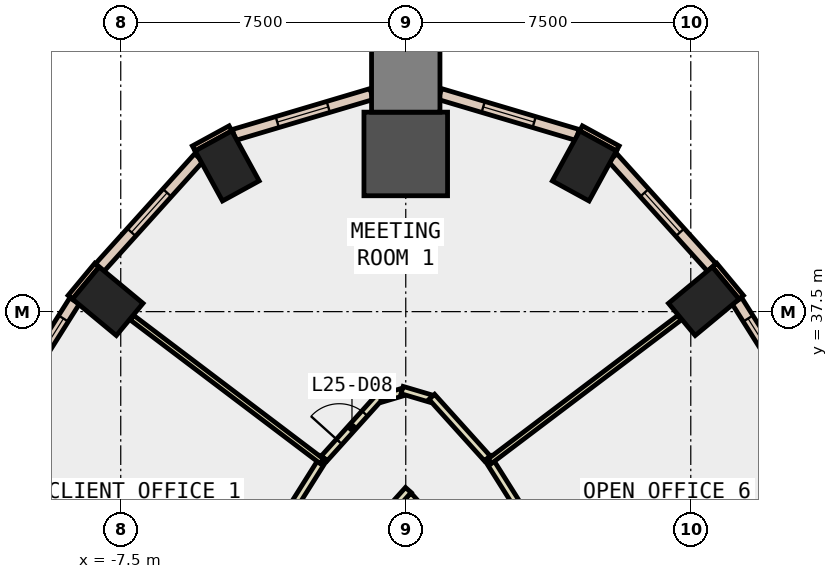
"""IFC4 building model, lengths in metres.
Left out: names, types, materials, properties, quantities, classifications, styles, units other than length and angle.
Written with IfcOpenShell. Run it as: python <this file> out.ifc"""

import sys

from ifc_helpers import new_model, si_unit, direction, frame, frame_2d, origin, origin_2d, place, context, subcontext, project, spatial, rectangle, extrude, element, fill, save


model = new_model("IFC4")
c1 = context("Model", 3, precision=1e-05, world=origin(), true_north=direction((0.0, 1.0)))
c2 = subcontext(c1, "Body", "Model", "MODEL_VIEW")
j1 = project(units=[si_unit("LENGTHUNIT", "METRE"), si_unit("PLANEANGLEUNIT", "RADIAN")], contexts=[c1])
p1 = place(None, origin())
s1 = spatial("IfcSite", under=j1, at=p1, CompositionType="ELEMENT")
p2 = place(p1, origin())
s2 = spatial("IfcBuilding", under=s1, at=p2, CompositionType="ELEMENT")
p3 = place(p2, frame((0.0, 0.0, 116.0)))
s3 = spatial("IfcBuildingStorey", under=s2, at=p3, CompositionType="ELEMENT", Elevation=116.0)
for number, where, z_axis, x_axis in (
    (1, (7.842, 37.774, -0.4), (0.0, 0.0, 1.0), (-0.638, 0.77, 0.0)),
    (2, (4.7, 41.334, -0.4), (0.0, 0.0, 1.0), (-0.877, 0.48, 0.0)),
):
    element("IfcColumn", number, at=place(p3, frame(where, z_axis=z_axis, x_axis=x_axis)), inside=s3, PredefinedType="COLUMN", context=c2, shape_type="SweptSolid", body=[
        extrude(rectangle(XDim=1.1, YDim=1.5, at=origin_2d()), origin(), (0.0, 0.0, 1.0), 4.2),
    ])
p4 = place(p3, frame((0.0, 41.649, -0.4), z_axis=(0.0, 0.0, 1.0), x_axis=(0.0, 1.0, 0.0)))
e3 = element("IfcColumn", 3, at=p4, inside=s3, PredefinedType="COLUMN", context=c2, shape_type="SweptSolid", body=[
    extrude(rectangle(XDim=2.2, YDim=2.2, at=origin_2d()), origin(), (0.0, 0.0, 1.0), 4.2),
])
for number, where, z_axis, x_axis in (
    (4, (-4.7, 41.334, -0.4), (0.0, 0.0, 1.0), (0.877, 0.48, 0.0)),
    (5, (-7.842, 37.774, -0.4), (0.0, 0.0, 1.0), (0.638, 0.77, 0.0)),
):
    element("IfcColumn", number, at=place(p3, frame(where, z_axis=z_axis, x_axis=x_axis)), inside=s3, PredefinedType="COLUMN", context=c2, shape_type="SweptSolid", body=[
        extrude(rectangle(XDim=1.1, YDim=1.5, at=origin_2d()), origin(), (0.0, 0.0, 1.0), 4.2),
    ])
p5 = place(p3, frame((0.0, 43.649, -0.4), z_axis=(0.0, 0.0, 1.0), x_axis=(0.0, 1.0, 0.0)))
e6 = element("IfcColumn", 6, at=p5, inside=s3, PredefinedType="COLUMN", context=c2, shape_type="SweptSolid", body=[
    extrude(rectangle(XDim=1.8, YDim=1.8, at=origin_2d()), origin(), (0.0, 0.0, 1.0), 4.2),
])
for number, where, z_axis, x_axis in (
    (7, (5.579, 41.794, 0.0), (0.0, 0.0, 1.0), (-0.877, 0.48, 0.0)),
    (8, (-4.613, 42.322, 0.0), (0.0, 0.0, 1.0), (-0.877, -0.48, 0.0)),
):
    element("IfcWall", number, at=place(p3, frame(where, z_axis=z_axis, x_axis=x_axis)), inside=s3, PredefinedType="STANDARD", context=c2, shape_type="SweptSolid", body=[
        extrude(rectangle(XDim=1.101, YDim=0.15, at=frame_2d((0.551, 0.0))), origin(), (0.0, 0.0, 1.0), 3.8),
    ])
for number, where, z_axis, x_axis in (
    (9, (8.828, 37.878, 0.0), (0.0, 0.0, 1.0), (-0.638, 0.77, 0.0)),
    (10, (-8.126, 38.724, 0.0), (0.0, 0.0, 1.0), (-0.638, -0.77, 0.0)),
):
    element("IfcWall", number, at=place(p3, frame(where, z_axis=z_axis, x_axis=x_axis)), inside=s3, PredefinedType="STANDARD", context=c2, shape_type="SweptSolid", body=[
        extrude(rectangle(XDim=1.099, YDim=0.15, at=frame_2d((0.55, 0.0))), origin(), (0.0, 0.0, 1.0), 3.8),
    ])
p6 = place(p3, frame((12.018, 32.535, 0.0), z_axis=(0.0, 0.0, 1.0), x_axis=(-0.532699467907, 0.846304482377, 0.0)))
e11 = element("IfcWall", 11, at=p6, inside=s3, PredefinedType="STANDARD", context=c2, shape_type="SweptSolid", body=[
    extrude(rectangle(XDim=6.202, YDim=0.3, at=frame_2d((3.101, 0.0))), origin(), (0.0, 0.0, 1.0), 3.8),
])
p7 = place(p6, frame((0.551, 0.0, 0.9)))
e12 = element("IfcOpeningElement", 12, at=p7, cuts=e11, PredefinedType="OPENING", context=c2, shape_type="SweptSolid", body=[
    extrude(rectangle(XDim=2.0, YDim=2.6, at=frame_2d((1.0, 1.3))), frame((0.0, 0.16, 0.0), z_axis=(0.0, -1.0, 0.0), x_axis=(1.0, 0.0, 0.0)), (0.0, 0.0, 1.0), 0.32),
])
p8 = place(p6, frame((3.652, 0.0, 0.9)))
e13 = element("IfcOpeningElement", 13, at=p8, cuts=e11, PredefinedType="OPENING", context=c2, shape_type="SweptSolid", body=[
    extrude(rectangle(XDim=2.0, YDim=2.6, at=frame_2d((1.0, 1.3))), frame((0.0, 0.16, 0.0), z_axis=(0.0, -1.0, 0.0), x_axis=(1.0, 0.0, 0.0)), (0.0, 0.0, 1.0), 0.32),
])
p9 = place(p3, frame((8.052, 38.661, 0.0), z_axis=(0.0, 0.0, 1.0), x_axis=(-0.66966434159, 0.742663900834, 0.0)))
e14 = element("IfcWall", 14, at=p9, inside=s3, PredefinedType="STANDARD", context=c2, shape_type="SweptSolid", body=[
    extrude(rectangle(XDim=3.893, YDim=0.3, at=frame_2d((1.946, 0.0))), origin(), (0.0, 0.0, 1.0), 3.8),
])
p10 = place(p9, frame((1.246, 0.0, 0.9)))
e15 = element("IfcOpeningElement", 15, at=p10, cuts=e14, PredefinedType="OPENING", context=c2, shape_type="SweptSolid", body=[
    extrude(rectangle(XDim=1.4, YDim=2.6, at=frame_2d((0.7, 1.3))), frame((0.0, 0.16, 0.0), z_axis=(0.0, -1.0, 0.0), x_axis=(1.0, 0.0, 0.0)), (0.0, 0.0, 1.0), 0.32),
])
p11 = place(p3, frame((4.52, 42.149, 0.0), z_axis=(0.0, 0.0, 1.0), x_axis=(-0.958563070772, 0.284880394819, 0.0)))
e16 = element("IfcWall", 16, at=p11, inside=s3, PredefinedType="STANDARD", context=c2, shape_type="SweptSolid", body=[
    extrude(rectangle(XDim=3.778, YDim=0.3, at=frame_2d((1.889, 0.0))), origin(), (0.0, 0.0, 1.0), 3.8),
])
p12 = place(p11, frame((1.189, 0.0, 0.9)))
e17 = element("IfcOpeningElement", 17, at=p12, cuts=e16, PredefinedType="OPENING", context=c2, shape_type="SweptSolid", body=[
    extrude(rectangle(XDim=1.4, YDim=2.6, at=frame_2d((0.7, 1.3))), frame((0.0, 0.16, 0.0), z_axis=(0.0, -1.0, 0.0), x_axis=(1.0, 0.0, 0.0)), (0.0, 0.0, 1.0), 0.32),
])
p13 = place(p3, frame((-0.899, 43.225, 0.0), z_axis=(0.0, 0.0, 1.0), x_axis=(-0.958563070772, -0.284880394819, 0.0)))
e18 = element("IfcWall", 18, at=p13, inside=s3, PredefinedType="STANDARD", context=c2, shape_type="SweptSolid", body=[
    extrude(rectangle(XDim=3.778, YDim=0.3, at=frame_2d((1.889, 0.0))), origin(), (0.0, 0.0, 1.0), 3.8),
])
p14 = place(p13, frame((1.189, 0.0, 0.9)))
e19 = element("IfcOpeningElement", 19, at=p14, cuts=e18, PredefinedType="OPENING", context=c2, shape_type="SweptSolid", body=[
    extrude(rectangle(XDim=1.4, YDim=2.6, at=frame_2d((0.7, 1.3))), frame((0.0, 0.16, 0.0), z_axis=(0.0, -1.0, 0.0), x_axis=(1.0, 0.0, 0.0)), (0.0, 0.0, 1.0), 0.32),
])
p15 = place(p3, frame((-5.445, 41.552, 0.0), z_axis=(0.0, 0.0, 1.0), x_axis=(-0.66966434159, -0.742663900834, 0.0)))
e20 = element("IfcWall", 20, at=p15, inside=s3, PredefinedType="STANDARD", context=c2, shape_type="SweptSolid", body=[
    extrude(rectangle(XDim=3.893, YDim=0.3, at=frame_2d((1.946, 0.0))), origin(), (0.0, 0.0, 1.0), 3.8),
])
p16 = place(p15, frame((1.246, 0.0, 0.9)))
e21 = element("IfcOpeningElement", 21, at=p16, cuts=e20, PredefinedType="OPENING", context=c2, shape_type="SweptSolid", body=[
    extrude(rectangle(XDim=1.4, YDim=2.6, at=frame_2d((0.7, 1.3))), frame((0.0, 0.16, 0.0), z_axis=(0.0, -1.0, 0.0), x_axis=(1.0, 0.0, 0.0)), (0.0, 0.0, 1.0), 0.32),
])
p17 = place(p3, frame((-8.714, 37.784, 0.0), z_axis=(0.0, 0.0, 1.0), x_axis=(-0.532699467907, -0.846304482377, 0.0)))
e22 = element("IfcWall", 22, at=p17, inside=s3, PredefinedType="STANDARD", context=c2, shape_type="SweptSolid", body=[
    extrude(rectangle(XDim=6.202, YDim=0.3, at=frame_2d((3.101, 0.0))), origin(), (0.0, 0.0, 1.0), 3.8),
])
p18 = place(p17, frame((0.551, 0.0, 0.9)))
e23 = element("IfcOpeningElement", 23, at=p18, cuts=e22, PredefinedType="OPENING", context=c2, shape_type="SweptSolid", body=[
    extrude(rectangle(XDim=2.0, YDim=2.6, at=frame_2d((1.0, 1.3))), frame((0.0, 0.16, 0.0), z_axis=(0.0, -1.0, 0.0), x_axis=(1.0, 0.0, 0.0)), (0.0, 0.0, 1.0), 0.32),
])
p19 = place(p17, frame((3.652, 0.0, 0.9)))
e24 = element("IfcOpeningElement", 24, at=p19, cuts=e22, PredefinedType="OPENING", context=c2, shape_type="SweptSolid", body=[
    extrude(rectangle(XDim=2.0, YDim=2.6, at=frame_2d((1.0, 1.3))), frame((0.0, 0.16, 0.0), z_axis=(0.0, -1.0, 0.0), x_axis=(1.0, 0.0, 0.0)), (0.0, 0.0, 1.0), 0.32),
])
p20 = place(p3, frame((0.384, 32.306, 0.0), z_axis=(0.0, 0.0, 1.0), x_axis=(-0.669306261406, 0.742986627365, 0.0)))
e25 = element("IfcWall", 25, at=p20, inside=s3, PredefinedType="PARTITIONING", context=c2, shape_type="SweptSolid", body=[
    extrude(rectangle(XDim=0.474, YDim=0.2, at=frame_2d((0.237, 0.0))), origin(), (0.0, 0.0, 1.0), 3.8),
])
p21 = place(p3, frame((0.067, 32.807, 0.0), z_axis=(0.0, 0.0, 1.0), x_axis=(-0.66900475403, -0.74325812413, 0.0)))
e26 = element("IfcWall", 26, at=p21, inside=s3, PredefinedType="PARTITIONING", context=c2, shape_type="SweptSolid", body=[
    extrude(rectangle(XDim=0.674, YDim=0.2, at=frame_2d((0.337, 0.0))), origin(), (0.0, 0.0, 1.0), 3.8),
])
p22 = place(p3, frame((2.159, 33.649, 0.0), z_axis=(0.0, 0.0, 1.0), x_axis=(0.532784927572, -0.846250684462, 0.0)))
e27 = element("IfcWall", 27, at=p22, inside=s3, PredefinedType="PARTITIONING", context=c2, shape_type="SweptSolid", body=[
    extrude(rectangle(XDim=6.626, YDim=0.2, at=frame_2d((3.313, 0.0))), origin(), (0.0, 0.0, 1.0), 3.8),
])
p23 = place(p22, frame((2.888, 0.0, 0.0)))
e28 = element("IfcOpeningElement", 28, at=p23, cuts=e27, PredefinedType="OPENING", context=c2, shape_type="SweptSolid", body=[
    extrude(rectangle(XDim=1.0, YDim=2.1, at=frame_2d((0.5, 1.05))), frame((0.0, 0.11, 0.0), z_axis=(0.0, -1.0, 0.0), x_axis=(1.0, 0.0, 0.0)), (0.0, 0.0, 1.0), 0.22),
])
p24 = place(p3, frame((-2.145, 33.639, 0.0), z_axis=(0.0, 0.0, 1.0), x_axis=(0.66965737341, 0.742670184023, 0.0)))
e29 = element("IfcWall", 29, at=p24, inside=s3, PredefinedType="PARTITIONING", context=c2, shape_type="SweptSolid", body=[
    extrude(rectangle(XDim=2.18, YDim=0.2, at=frame_2d((1.09, 0.0))), origin(), (0.0, 0.0, 1.0), 3.8),
])
p25 = place(p24, frame((0.59, 0.0, 0.0)))
e30 = element("IfcOpeningElement", 30, at=p25, cuts=e29, PredefinedType="OPENING", context=c2, shape_type="SweptSolid", body=[
    extrude(rectangle(XDim=1.0, YDim=2.1, at=frame_2d((0.5, 1.05))), frame((0.0, 0.11, 0.0), z_axis=(0.0, -1.0, 0.0), x_axis=(1.0, 0.0, 0.0)), (0.0, 0.0, 1.0), 0.22),
])
p26 = place(p3, frame((-0.656, 35.213, 0.0), z_axis=(0.0, 0.0, 1.0), x_axis=(0.958764375257, 0.284202168777, 0.0)))
e31 = element("IfcWall", 31, at=p26, inside=s3, PredefinedType="PARTITIONING", context=c2, shape_type="SweptSolid", body=[
    extrude(rectangle(XDim=0.584, YDim=0.2, at=frame_2d((0.292, 0.0))), origin(), (0.0, 0.0, 1.0), 3.8),
])
p27 = place(p3, frame((-0.096, 35.436, 0.0), z_axis=(0.0, 0.0, 1.0), x_axis=(0.95867870552, -0.284491018456, 0.0)))
e32 = element("IfcWall", 32, at=p27, inside=s3, PredefinedType="PARTITIONING", context=c2, shape_type="SweptSolid", body=[
    extrude(rectangle(XDim=0.784, YDim=0.2, at=frame_2d((0.392, 0.0))), origin(), (0.0, 0.0, 1.0), 3.8),
])
p28 = place(p3, frame((0.685, 35.258, 0.0), z_axis=(0.0, 0.0, 1.0), x_axis=(0.66965737341, -0.742670184023, 0.0)))
e33 = element("IfcWall", 33, at=p28, inside=s3, PredefinedType="PARTITIONING", context=c2, shape_type="SweptSolid", body=[
    extrude(rectangle(XDim=2.18, YDim=0.2, at=frame_2d((1.09, 0.0))), origin(), (0.0, 0.0, 1.0), 3.8),
])
p29 = place(p3, frame((-5.769, 27.915, 0.0), z_axis=(0.0, 0.0, 1.0), x_axis=(0.532800846123, 0.846240662206, 0.0)))
e34 = element("IfcWall", 34, at=p29, inside=s3, PredefinedType="PARTITIONING", context=c2, shape_type="SweptSolid", body=[
    extrude(rectangle(XDim=6.776, YDim=0.2, at=frame_2d((3.388, 0.0))), origin(), (0.0, 0.0, 1.0), 3.8),
])
p30 = place(p29, frame((2.888, 0.0, 0.0)))
e35 = element("IfcOpeningElement", 35, at=p30, cuts=e34, PredefinedType="OPENING", context=c2, shape_type="SweptSolid", body=[
    extrude(rectangle(XDim=1.0, YDim=2.1, at=frame_2d((0.5, 1.05))), frame((0.0, 0.11, 0.0), z_axis=(0.0, -1.0, 0.0), x_axis=(1.0, 0.0, 0.0)), (0.0, 0.0, 1.0), 0.22),
])
for number, where, z_axis, x_axis in (
    (36, (2.212, 33.565, 0.0), (0.0, 0.0, 1.0), (0.797, 0.603, 0.0)),
    (37, (-2.212, 33.565, 0.0), (0.0, 0.0, 1.0), (-0.797, 0.603, 0.0)),
):
    element("IfcWall", number, at=place(p3, frame(where, z_axis=z_axis, x_axis=x_axis)), inside=s3, PredefinedType="PARTITIONING", context=c2, shape_type="SweptSolid", body=[
        extrude(rectangle(XDim=6.257, YDim=0.15, at=frame_2d((3.128, 0.0))), origin(), (0.0, 0.0, 1.0), 3.8),
    ])
p31 = place(p8, origin())
e38 = element("IfcWindow", 38, at=p31, inside=s3, PartitioningType="SINGLE_PANEL", PredefinedType="WINDOW", context=c2, shape_type="SweptSolid", body=[
    extrude(rectangle(XDim=2.0, YDim=2.6, at=frame_2d((1.0, 1.3))), frame((0.0, 0.03, 0.0), z_axis=(0.0, -1.0, 0.0), x_axis=(1.0, 0.0, 0.0)), (0.0, 0.0, 1.0), 0.06),
])
fill(e13, e38)
p32 = place(p10, origin())
e39 = element("IfcWindow", 39, at=p32, inside=s3, PartitioningType="SINGLE_PANEL", PredefinedType="WINDOW", context=c2, shape_type="SweptSolid", body=[
    extrude(rectangle(XDim=1.4, YDim=2.6, at=frame_2d((0.7, 1.3))), frame((0.0, 0.03, 0.0), z_axis=(0.0, -1.0, 0.0), x_axis=(1.0, 0.0, 0.0)), (0.0, 0.0, 1.0), 0.06),
])
fill(e15, e39)
p33 = place(p12, origin())
e40 = element("IfcWindow", 40, at=p33, inside=s3, PartitioningType="SINGLE_PANEL", PredefinedType="WINDOW", context=c2, shape_type="SweptSolid", body=[
    extrude(rectangle(XDim=1.4, YDim=2.6, at=frame_2d((0.7, 1.3))), frame((0.0, 0.03, 0.0), z_axis=(0.0, -1.0, 0.0), x_axis=(1.0, 0.0, 0.0)), (0.0, 0.0, 1.0), 0.06),
])
fill(e17, e40)
p34 = place(p14, origin())
e41 = element("IfcWindow", 41, at=p34, inside=s3, PartitioningType="SINGLE_PANEL", PredefinedType="WINDOW", context=c2, shape_type="SweptSolid", body=[
    extrude(rectangle(XDim=1.4, YDim=2.6, at=frame_2d((0.7, 1.3))), frame((0.0, 0.03, 0.0), z_axis=(0.0, -1.0, 0.0), x_axis=(1.0, 0.0, 0.0)), (0.0, 0.0, 1.0), 0.06),
])
fill(e19, e41)
p35 = place(p16, origin())
e42 = element("IfcWindow", 42, at=p35, inside=s3, PartitioningType="SINGLE_PANEL", PredefinedType="WINDOW", context=c2, shape_type="SweptSolid", body=[
    extrude(rectangle(XDim=1.4, YDim=2.6, at=frame_2d((0.7, 1.3))), frame((0.0, 0.03, 0.0), z_axis=(0.0, -1.0, 0.0), x_axis=(1.0, 0.0, 0.0)), (0.0, 0.0, 1.0), 0.06),
])
fill(e21, e42)
p36 = place(p18, origin())
e43 = element("IfcWindow", 43, at=p36, inside=s3, PartitioningType="SINGLE_PANEL", PredefinedType="WINDOW", context=c2, shape_type="SweptSolid", body=[
    extrude(rectangle(XDim=2.0, YDim=2.6, at=frame_2d((1.0, 1.3))), frame((0.0, 0.03, 0.0), z_axis=(0.0, -1.0, 0.0), x_axis=(1.0, 0.0, 0.0)), (0.0, 0.0, 1.0), 0.06),
])
fill(e23, e43)
p37 = place(p25, origin())
e44 = element("IfcDoor", 44, at=p37, inside=s3, OperationType="SINGLE_SWING_LEFT", PredefinedType="DOOR", context=c2, shape_type="SweptSolid", body=[
    extrude(rectangle(XDim=1.0, YDim=2.1, at=frame_2d((0.5, 1.05))), frame((0.0, 0.025, 0.0), z_axis=(0.0, -1.0, 0.0), x_axis=(1.0, 0.0, 0.0)), (0.0, 0.0, 1.0), 0.05),
])
fill(e30, e44)
save(model, sys.argv[1])
